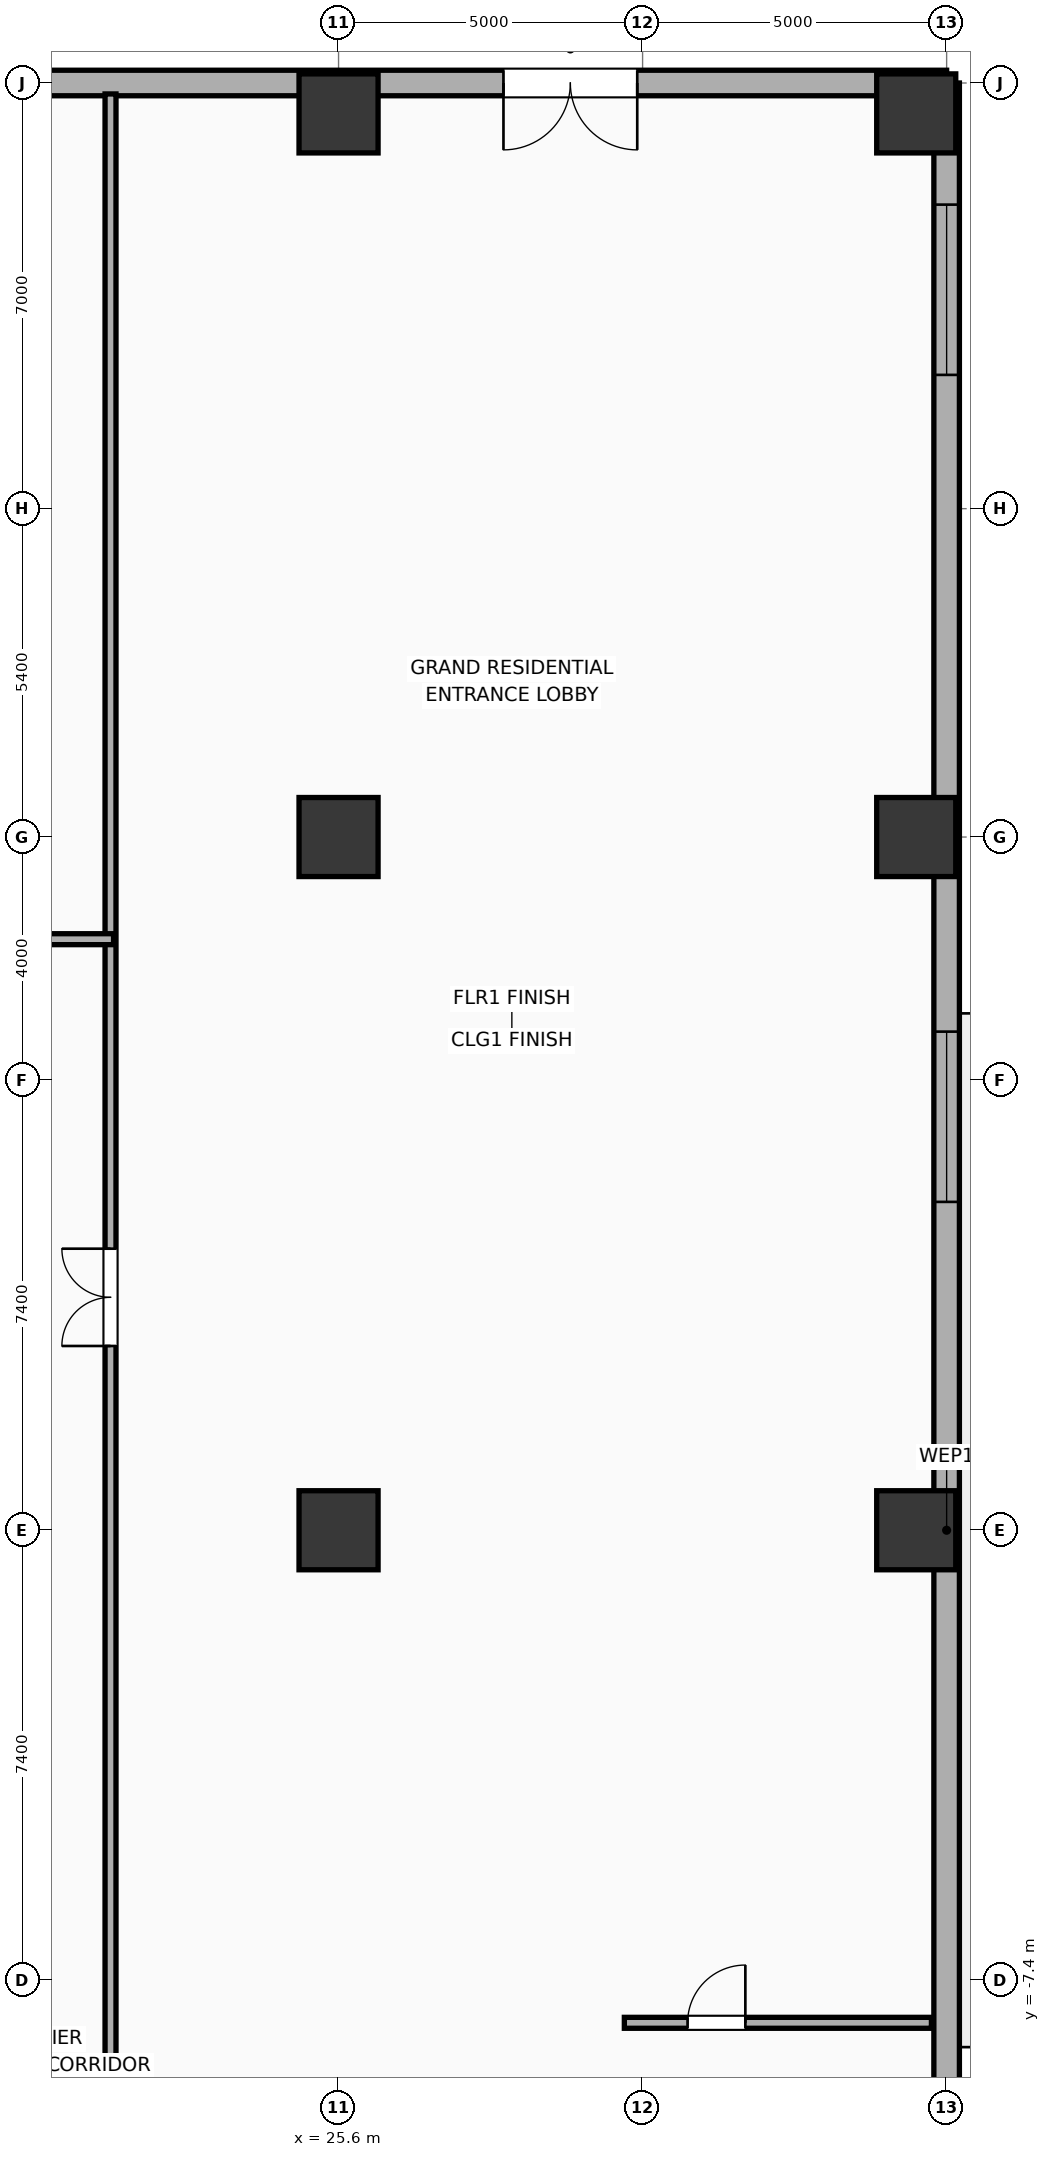
"""IFC4 building model, lengths in metres.
Left out: names, types, materials, properties, quantities, classifications, styles, units other than length and angle.
Written with IfcOpenShell. Run it as: python <this file> out.ifc"""

import sys

from ifc_helpers import new_model, si_unit, direction, frame, frame_2d, origin, origin_2d, place, context, subcontext, project, spatial, rectangle, extrude, element, fill, save


model = new_model("IFC4")
c1 = context("Model", 3, precision=1e-05, world=origin(), true_north=direction((0.0, 1.0)))
c2 = subcontext(c1, "Body", "Model", "MODEL_VIEW")
j1 = project(units=[si_unit("LENGTHUNIT", "METRE"), si_unit("PLANEANGLEUNIT", "RADIAN")], contexts=[c1])
p1 = place(None, origin())
s1 = spatial("IfcSite", under=j1, at=p1, CompositionType="ELEMENT")
p2 = place(p1, origin())
s2 = spatial("IfcBuilding", under=s1, at=p2, CompositionType="ELEMENT")
p3 = place(p2, origin())
s3 = spatial("IfcBuildingStorey", under=s2, at=p3, CompositionType="ELEMENT", Elevation=0.0)
for number, where, z_axis, x_axis in (
    (1, (25.6, 0.0, 0.0), (0.0, 0.0, 1.0), (1.0, 0.0, 0.0)),
    (2, (25.6, 11.4, 0.0), (0.0, 0.0, 1.0), (1.0, 0.0, 0.0)),
    (3, (25.6, 23.3, 0.0), (0.0, 0.0, 1.0), (1.0, 0.0, 0.0)),
    (4, (35.1, 0.0, 0.0), (0.0, 0.0, 1.0), (1.0, 0.0, 0.0)),
    (5, (35.1, 11.4, 0.0), (0.0, 0.0, 1.0), (1.0, 0.0, 0.0)),
    (6, (35.1, 23.3, 0.0), (0.0, 0.0, 1.0), (1.0, 0.0, 0.0)),
):
    element("IfcColumn", number, at=place(p3, frame(where, z_axis=z_axis, x_axis=x_axis)), inside=s3, PredefinedType="COLUMN", context=c2, shape_type="SweptSolid", body=[
        extrude(rectangle(XDim=1.3, YDim=1.3, at=origin_2d()), origin(), (0.0, 0.0, 1.0), 5.2),
    ])
p4 = place(p3, frame((35.6, -23.8, 0.0), z_axis=(0.0, 0.0, 1.0), x_axis=(0.0, 1.0, 0.0)))
e7 = element("IfcWall", 7, at=p4, inside=s3, PredefinedType="ELEMENTEDWALL", context=c2, shape_type="SweptSolid", body=[
    extrude(rectangle(XDim=47.6, YDim=0.42, at=frame_2d((23.8, 0.0))), origin(), (0.0, 0.0, 1.0), 4.92),
])
p5 = place(p4, frame((2.0, 0.0, 0.65)))
e8 = element("IfcOpeningElement", 8, at=p5, cuts=e7, PredefinedType="OPENING", context=c2, shape_type="SweptSolid", body=[
    extrude(rectangle(XDim=2.8, YDim=2.6, at=frame_2d((1.4, 1.3))), frame((0.0, 0.22, 0.0), z_axis=(0.0, -1.0, 0.0), x_axis=(1.0, 0.0, 0.0)), (0.0, 0.0, 1.0), 0.44),
])
p6 = place(p4, frame((29.2, 0.0, 0.65)))
e9 = element("IfcOpeningElement", 9, at=p6, cuts=e7, PredefinedType="OPENING", context=c2, shape_type="SweptSolid", body=[
    extrude(rectangle(XDim=2.8, YDim=2.6, at=frame_2d((1.4, 1.3))), frame((0.0, 0.22, 0.0), z_axis=(0.0, -1.0, 0.0), x_axis=(1.0, 0.0, 0.0)), (0.0, 0.0, 1.0), 0.44),
])
p7 = place(p4, frame((42.8, 0.0, 0.65)))
e10 = element("IfcOpeningElement", 10, at=p7, cuts=e7, PredefinedType="OPENING", context=c2, shape_type="SweptSolid", body=[
    extrude(rectangle(XDim=2.8, YDim=2.6, at=frame_2d((1.4, 1.3))), frame((0.0, 0.22, 0.0), z_axis=(0.0, -1.0, 0.0), x_axis=(1.0, 0.0, 0.0)), (0.0, 0.0, 1.0), 0.44),
])
p8 = place(p3, frame((35.6, 23.8, 0.0), z_axis=(0.0, 0.0, 1.0), x_axis=(-1.0, 0.0, 0.0)))
e11 = element("IfcWall", 11, at=p8, inside=s3, PredefinedType="ELEMENTEDWALL", context=c2, shape_type="SweptSolid", body=[
    extrude(rectangle(XDim=22.1, YDim=0.42, at=frame_2d((11.05, 0.0))), origin(), (0.0, 0.0, 1.0), 4.92),
])
p9 = place(p8, frame((5.088, 0.0, 0.0)))
e12 = element("IfcOpeningElement", 12, at=p9, cuts=e11, PredefinedType="OPENING", context=c2, shape_type="SweptSolid", body=[
    extrude(rectangle(XDim=2.2, YDim=2.4, at=frame_2d((1.1, 1.2))), frame((0.0, 0.22, 0.0), z_axis=(0.0, -1.0, 0.0), x_axis=(1.0, 0.0, 0.0)), (0.0, 0.0, 1.0), 0.44),
])
p10 = place(p8, frame((14.812, 0.0, 0.0)))
e13 = element("IfcOpeningElement", 13, at=p10, cuts=e11, PredefinedType="OPENING", context=c2, shape_type="SweptSolid", body=[
    extrude(rectangle(XDim=2.2, YDim=2.4, at=frame_2d((1.1, 1.2))), frame((0.0, 0.22, 0.0), z_axis=(0.0, -1.0, 0.0), x_axis=(1.0, 0.0, 0.0)), (0.0, 0.0, 1.0), 0.44),
])
p11 = place(p3, frame((21.85, -10.5, 0.0), z_axis=(0.0, 0.0, 1.0), x_axis=(0.0, 1.0, 0.0)))
e14 = element("IfcWall", 14, at=p11, inside=s3, PredefinedType="PARTITIONING", context=c2, shape_type="SweptSolid", body=[
    extrude(rectangle(XDim=34.12, YDim=0.18, at=frame_2d((17.06, 0.0))), origin(), (0.0, 0.0, 1.0), 4.92),
])
p12 = place(p11, frame((13.531, 0.0, 0.0)))
e15 = element("IfcOpeningElement", 15, at=p12, cuts=e14, PredefinedType="OPENING", context=c2, shape_type="SweptSolid", body=[
    extrude(rectangle(XDim=1.6, YDim=2.05, at=frame_2d((0.8, 1.025))), frame((0.0, 0.1, 0.0), z_axis=(0.0, -1.0, 0.0), x_axis=(1.0, 0.0, 0.0)), (0.0, 0.0, 1.0), 0.2),
])
p13 = place(p3, frame((30.3, -8.1, 0.0), z_axis=(0.0, 0.0, 1.0), x_axis=(1.0, 0.0, 0.0)))
e16 = element("IfcWall", 16, at=p13, inside=s3, PredefinedType="PARTITIONING", context=c2, shape_type="SweptSolid", body=[
    extrude(rectangle(XDim=5.05, YDim=0.18, at=frame_2d((2.525, 0.0))), origin(), (0.0, 0.0, 1.0), 4.92),
])
p14 = place(p13, frame((1.04, 0.0, 0.0)))
e17 = element("IfcOpeningElement", 17, at=p14, cuts=e16, PredefinedType="OPENING", context=c2, shape_type="SweptSolid", body=[
    extrude(rectangle(XDim=0.95, YDim=2.05, at=frame_2d((0.475, 1.025))), frame((0.0, 0.1, 0.0), z_axis=(0.0, -1.0, 0.0), x_axis=(1.0, 0.0, 0.0)), (0.0, 0.0, 1.0), 0.2),
])
p15 = place(p3, frame((13.52, 9.72, 0.0), z_axis=(0.0, 0.0, 1.0), x_axis=(1.0, 0.0, 0.0)))
e18 = element("IfcWall", 18, at=p15, inside=s3, PredefinedType="PARTITIONING", context=c2, shape_type="SweptSolid", body=[
    extrude(rectangle(XDim=8.38, YDim=0.18, at=frame_2d((4.19, 0.0))), origin(), (0.0, 0.0, 1.0), 4.92),
])
p16 = place(p15, frame((3.39, 0.0, 0.0)))
e19 = element("IfcOpeningElement", 19, at=p16, cuts=e18, PredefinedType="OPENING", context=c2, shape_type="SweptSolid", body=[
    extrude(rectangle(XDim=1.6, YDim=2.05, at=frame_2d((0.8, 1.025))), frame((0.0, 0.1, 0.0), z_axis=(0.0, -1.0, 0.0), x_axis=(1.0, 0.0, 0.0)), (0.0, 0.0, 1.0), 0.2),
])
p17 = place(p6, origin())
e20 = element("IfcWindow", 20, at=p17, inside=s3, PartitioningType="SINGLE_PANEL", PredefinedType="WINDOW", context=c2, shape_type="SweptSolid", body=[
    extrude(rectangle(XDim=2.8, YDim=2.6, at=frame_2d((1.4, 1.3))), frame((0.0, 0.03, 0.0), z_axis=(0.0, -1.0, 0.0), x_axis=(1.0, 0.0, 0.0)), (0.0, 0.0, 1.0), 0.06),
])
fill(e9, e20)
p18 = place(p7, origin())
e21 = element("IfcWindow", 21, at=p18, inside=s3, PartitioningType="SINGLE_PANEL", PredefinedType="WINDOW", context=c2, shape_type="SweptSolid", body=[
    extrude(rectangle(XDim=2.8, YDim=2.6, at=frame_2d((1.4, 1.3))), frame((0.0, 0.03, 0.0), z_axis=(0.0, -1.0, 0.0), x_axis=(1.0, 0.0, 0.0)), (0.0, 0.0, 1.0), 0.06),
])
fill(e10, e21)
p19 = place(p9, origin())
e22 = element("IfcDoor", 22, at=p19, inside=s3, OperationType="DOUBLE_DOOR_SINGLE_SWING", PredefinedType="DOOR", context=c2, shape_type="SweptSolid", body=[
    extrude(rectangle(XDim=2.2, YDim=2.4, at=frame_2d((1.1, 1.2))), frame((0.0, 0.025, 0.0), z_axis=(0.0, -1.0, 0.0), x_axis=(1.0, 0.0, 0.0)), (0.0, 0.0, 1.0), 0.05),
])
fill(e12, e22)
p20 = place(p12, origin())
e23 = element("IfcDoor", 23, at=p20, inside=s3, OperationType="DOUBLE_DOOR_SINGLE_SWING", PredefinedType="DOOR", context=c2, shape_type="SweptSolid", body=[
    extrude(rectangle(XDim=1.6, YDim=2.05, at=frame_2d((0.8, 1.025))), frame((0.0, 0.025, 0.0), z_axis=(0.0, -1.0, 0.0), x_axis=(1.0, 0.0, 0.0)), (0.0, 0.0, 1.0), 0.05),
])
fill(e15, e23)
p21 = place(p14, origin())
e24 = element("IfcDoor", 24, at=p21, inside=s3, OperationType="SINGLE_SWING_RIGHT", PredefinedType="DOOR", context=c2, shape_type="SweptSolid", body=[
    extrude(rectangle(XDim=0.95, YDim=2.05, at=frame_2d((0.475, 1.025))), frame((0.0, 0.025, 0.0), z_axis=(0.0, -1.0, 0.0), x_axis=(1.0, 0.0, 0.0)), (0.0, 0.0, 1.0), 0.05),
])
fill(e17, e24)
save(model, sys.argv[1])
